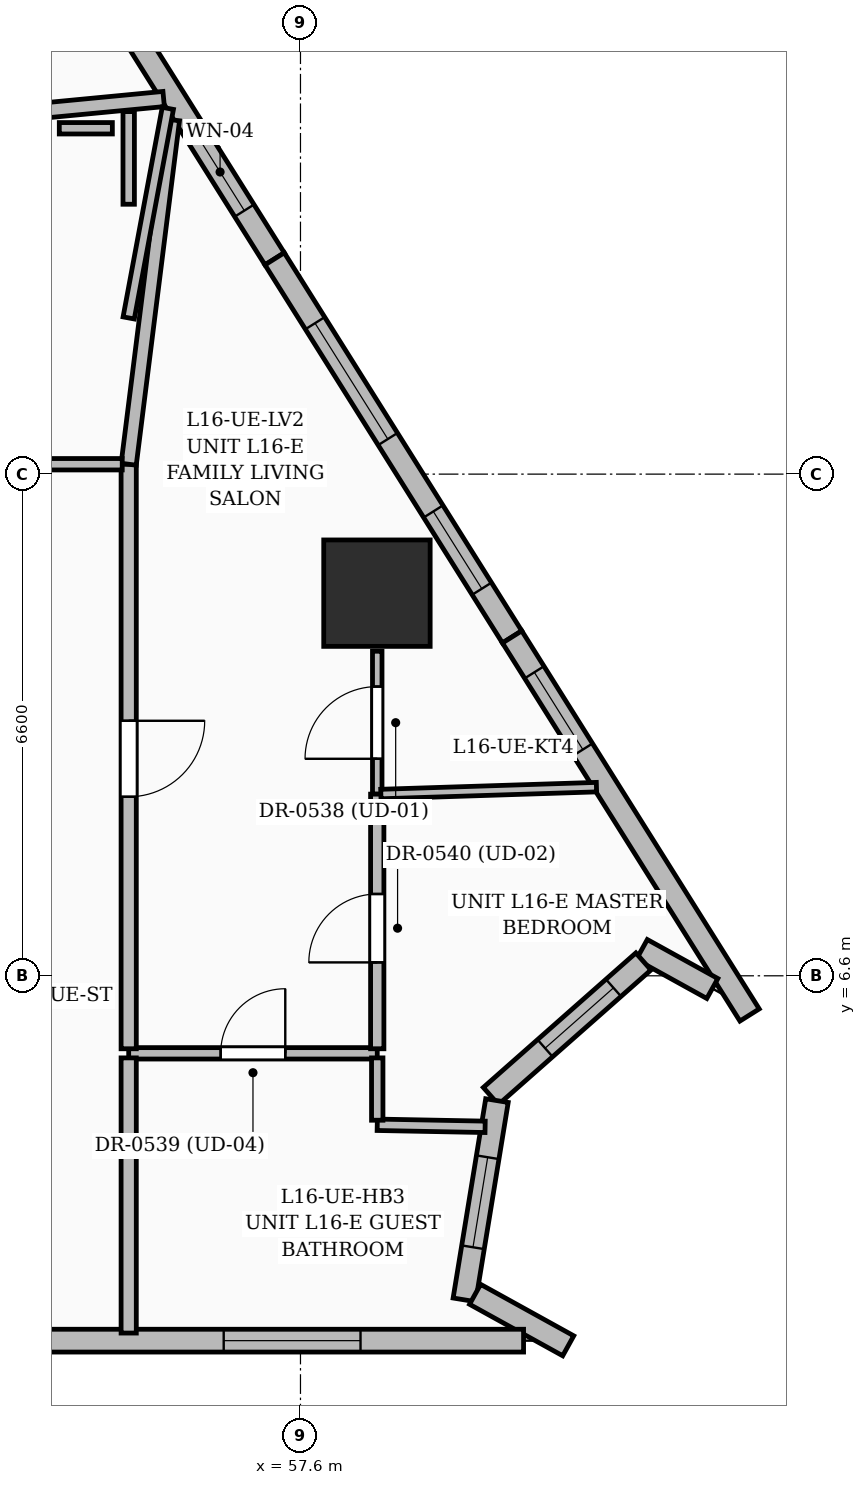
"""IFC4 building model, lengths in metres.
Left out: names, types, materials, properties, quantities, classifications, styles, units other than length and angle.
Written with IfcOpenShell. Run it as: python <this file> out.ifc"""

import sys

from ifc_helpers import new_model, si_unit, direction, frame, frame_2d, origin, origin_2d, place, context, subcontext, project, spatial, rectangle, extrude, element, fill, save


model = new_model("IFC4")
c1 = context("Model", 3, precision=1e-05, world=origin(), true_north=direction((0.0, 1.0)))
c2 = subcontext(c1, "Body", "Model", "MODEL_VIEW")
j1 = project(units=[si_unit("LENGTHUNIT", "METRE"), si_unit("PLANEANGLEUNIT", "RADIAN")], contexts=[c1])
p1 = place(None, origin())
s1 = spatial("IfcSite", under=j1, at=p1, CompositionType="ELEMENT")
p2 = place(p1, origin())
s2 = spatial("IfcBuilding", under=s1, at=p2, CompositionType="ELEMENT")
p3 = place(p2, frame((0.0, 0.0, 67.8)))
s3 = spatial("IfcBuildingStorey", under=s2, at=p3, CompositionType="ELEMENT", Elevation=67.8)
p4 = place(p3, frame((58.606, 11.634, 0.0), z_axis=(0.0, 0.0, 1.0), x_axis=(1.0, 0.0, 0.0)))
e1 = element("IfcColumn", 1, at=p4, inside=s3, PredefinedType="COLUMN", context=c2, shape_type="SweptSolid", body=[
    extrude(rectangle(XDim=1.4, YDim=1.4, at=origin_2d()), origin(), (0.0, 0.0, 1.0), 3.6),
])
p5 = place(p3, frame((54.282, 20.774, 0.0), z_axis=(0.0, 0.0, 1.0), x_axis=(0.531894679413, -0.846810516002, 0.0)))
e2 = element("IfcWall", 2, at=p5, inside=s3, PredefinedType="SOLIDWALL", context=c2, shape_type="SweptSolid", body=[
    extrude(rectangle(XDim=5.599, YDim=0.3, at=frame_2d((2.799, 0.0))), origin(), (0.0, 0.0, 1.0), 3.35),
])
p6 = place(p5, frame((3.65, 0.0, 0.8)))
e3 = element("IfcOpeningElement", 3, at=p6, cuts=e2, PredefinedType="OPENING", context=c2, shape_type="SweptSolid", body=[
    extrude(rectangle(XDim=1.2, YDim=1.8, at=frame_2d((0.6, 0.9))), frame((0.0, 0.16, 0.0), z_axis=(0.0, -1.0, 0.0), x_axis=(1.0, 0.0, 0.0)), (0.0, 0.0, 1.0), 0.32),
])
p7 = place(p3, frame((57.26, 16.032, 0.0), z_axis=(0.0, 0.0, 1.0), x_axis=(0.531936586971, -0.846784191776, 0.0)))
e4 = element("IfcWall", 4, at=p7, inside=s3, PredefinedType="SOLIDWALL", context=c2, shape_type="SweptSolid", body=[
    extrude(rectangle(XDim=5.874, YDim=0.3, at=frame_2d((2.937, 0.0))), origin(), (0.0, 0.0, 1.0), 3.35),
])
p8 = place(p7, frame((1.0, 0.0, 0.6)))
e5 = element("IfcOpeningElement", 5, at=p8, cuts=e4, PredefinedType="OPENING", context=c2, shape_type="SweptSolid", body=[
    extrude(rectangle(XDim=1.8, YDim=2.1, at=frame_2d((0.9, 1.05))), frame((0.0, 0.16, 0.0), z_axis=(0.0, -1.0, 0.0), x_axis=(1.0, 0.0, 0.0)), (0.0, 0.0, 1.0), 0.32),
])
p9 = place(p7, frame((3.925, 0.0, 0.8)))
e6 = element("IfcOpeningElement", 6, at=p9, cuts=e4, PredefinedType="OPENING", context=c2, shape_type="SweptSolid", body=[
    extrude(rectangle(XDim=1.2, YDim=1.8, at=frame_2d((0.6, 0.9))), frame((0.0, 0.16, 0.0), z_axis=(0.0, -1.0, 0.0), x_axis=(1.0, 0.0, 0.0)), (0.0, 0.0, 1.0), 0.32),
])
p10 = place(p3, frame((60.384, 11.059, 0.0), z_axis=(0.0, 0.0, 1.0), x_axis=(0.53188806159, -0.846814672723, 0.0)))
e7 = element("IfcWall", 7, at=p10, inside=s3, PredefinedType="SOLIDWALL", context=c2, shape_type="SweptSolid", body=[
    extrude(rectangle(XDim=5.874, YDim=0.3, at=frame_2d((2.937, 0.0))), origin(), (0.0, 0.0, 1.0), 3.35),
])
p11 = place(p10, frame((0.55, 0.0, 0.8)))
e8 = element("IfcOpeningElement", 8, at=p11, cuts=e7, PredefinedType="OPENING", context=c2, shape_type="SweptSolid", body=[
    extrude(rectangle(XDim=1.2, YDim=1.8, at=frame_2d((0.6, 0.9))), frame((0.0, 0.16, 0.0), z_axis=(0.0, -1.0, 0.0), x_axis=(1.0, 0.0, 0.0)), (0.0, 0.0, 1.0), 0.32),
])
p12 = place(p3, frame((63.018, 6.433, 0.0), z_axis=(0.0, 0.0, 1.0), x_axis=(-0.875144021508, 0.48386252347, 0.0)))
e9 = element("IfcWall", 9, at=p12, inside=s3, PredefinedType="SOLIDWALL", context=c2, shape_type="SweptSolid", body=[
    extrude(rectangle(XDim=1.06, YDim=0.3, at=frame_2d((0.53, 0.0))), origin(), (0.0, 0.0, 1.0), 3.35),
])
p13 = place(p3, frame((62.112, 6.789, 0.0), z_axis=(0.0, 0.0, 1.0), x_axis=(-0.749880449764, -0.661573360303, 0.0)))
e10 = element("IfcWall", 10, at=p13, inside=s3, PredefinedType="SOLIDWALL", context=c2, shape_type="SweptSolid", body=[
    extrude(rectangle(XDim=2.676, YDim=0.3, at=frame_2d((1.338, 0.0))), origin(), (0.0, 0.0, 1.0), 3.35),
])
p14 = place(p13, frame((0.525, 0.0, 0.8)))
e11 = element("IfcOpeningElement", 11, at=p14, cuts=e10, PredefinedType="OPENING", context=c2, shape_type="SweptSolid", body=[
    extrude(rectangle(XDim=1.2, YDim=1.8, at=frame_2d((0.6, 0.9))), frame((0.0, 0.16, 0.0), z_axis=(0.0, -1.0, 0.0), x_axis=(1.0, 0.0, 0.0)), (0.0, 0.0, 1.0), 0.32),
])
p15 = place(p3, frame((60.185, 4.958, 0.0), z_axis=(0.0, 0.0, 1.0), x_axis=(-0.16141694699, -0.986886300049, 0.0)))
e12 = element("IfcWall", 12, at=p15, inside=s3, PredefinedType="SOLIDWALL", context=c2, shape_type="SweptSolid", body=[
    extrude(rectangle(XDim=2.656, YDim=0.3, at=frame_2d((1.328, 0.0))), origin(), (0.0, 0.0, 1.0), 3.35),
])
p16 = place(p15, frame((0.755, 0.0, 0.8)))
e13 = element("IfcOpeningElement", 13, at=p16, cuts=e12, PredefinedType="OPENING", context=c2, shape_type="SweptSolid", body=[
    extrude(rectangle(XDim=1.2, YDim=1.8, at=frame_2d((0.6, 0.9))), frame((0.0, 0.16, 0.0), z_axis=(0.0, -1.0, 0.0), x_axis=(1.0, 0.0, 0.0)), (0.0, 0.0, 1.0), 0.32),
])
p17 = place(p3, frame((59.897, 2.41, 0.0), z_axis=(0.0, 0.0, 1.0), x_axis=(0.875216279123, -0.483731810777, 0.0)))
e14 = element("IfcWall", 14, at=p17, inside=s3, PredefinedType="SOLIDWALL", context=c2, shape_type="SweptSolid", body=[
    extrude(rectangle(XDim=1.4, YDim=0.3, at=frame_2d((0.7, 0.0))), origin(), (0.0, 0.0, 1.0), 3.35),
])
p18 = place(p3, frame((60.535, 1.8, 0.0), z_axis=(0.0, 0.0, 1.0), x_axis=(-1.0, 0.0, 0.0)))
e15 = element("IfcWall", 15, at=p18, inside=s3, PredefinedType="SOLIDWALL", context=c2, shape_type="SweptSolid", body=[
    extrude(rectangle(XDim=6.24, YDim=0.3, at=frame_2d((3.12, 0.0))), origin(), (0.0, 0.0, 1.0), 3.35),
])
p19 = place(p18, frame((2.145, 0.0, 0.6)))
e16 = element("IfcOpeningElement", 16, at=p19, cuts=e15, PredefinedType="OPENING", context=c2, shape_type="SweptSolid", body=[
    extrude(rectangle(XDim=1.8, YDim=2.1, at=frame_2d((0.9, 1.05))), frame((0.0, 0.16, 0.0), z_axis=(0.0, -1.0, 0.0), x_axis=(1.0, 0.0, 0.0)), (0.0, 0.0, 1.0), 0.32),
])
p20 = place(p3, frame((55.34, 5.58, 0.0), z_axis=(0.0, 0.0, 1.0), x_axis=(1.0, 0.0, 0.0)))
e17 = element("IfcWall", 17, at=p20, inside=s3, PredefinedType="PARTITIONING", context=c2, shape_type="SweptSolid", body=[
    extrude(rectangle(XDim=3.27, YDim=0.15, at=frame_2d((1.635, 0.0))), origin(), (0.0, 0.0, 1.0), 3.35),
])
p21 = place(p20, frame((1.21, 0.0, 0.0)))
e18 = element("IfcOpeningElement", 18, at=p21, cuts=e17, PredefinedType="OPENING", context=c2, shape_type="SweptSolid", body=[
    extrude(rectangle(XDim=0.85, YDim=2.1, at=frame_2d((0.425, 1.05))), frame((0.0, 0.085, 0.0), z_axis=(0.0, -1.0, 0.0), x_axis=(1.0, 0.0, 0.0)), (0.0, 0.0, 1.0), 0.17),
])
p22 = place(p3, frame((58.61, 8.99, 0.0), z_axis=(0.0, 0.0, 1.0), x_axis=(0.0, 1.0, 0.0)))
e19 = element("IfcWall", 19, at=p22, inside=s3, PredefinedType="PARTITIONING", context=c2, shape_type="SweptSolid", body=[
    extrude(rectangle(XDim=1.88, YDim=0.125, at=frame_2d((0.94, 0.0))), origin(), (0.0, 0.0, 1.0), 3.35),
])
p23 = place(p22, frame((0.465, 0.0, 0.0)))
e20 = element("IfcOpeningElement", 20, at=p23, cuts=e19, PredefinedType="OPENING", context=c2, shape_type="SweptSolid", body=[
    extrude(rectangle(XDim=0.95, YDim=2.2, at=frame_2d((0.475, 1.1))), frame((0.0, 0.072, 0.0), z_axis=(0.0, -1.0, 0.0), x_axis=(1.0, 0.0, 0.0)), (0.0, 0.0, 1.0), 0.145),
])
p24 = place(p3, frame((58.61, 5.64, 0.0), z_axis=(0.0, 0.0, 1.0), x_axis=(0.0, 1.0, 0.0)))
e21 = element("IfcWall", 21, at=p24, inside=s3, PredefinedType="PARTITIONING", context=c2, shape_type="SweptSolid", body=[
    extrude(rectangle(XDim=3.35, YDim=0.175, at=frame_2d((1.675, 0.0))), origin(), (0.0, 0.0, 1.0), 3.35),
])
p25 = place(p24, frame((1.136, 0.0, 0.0)))
e22 = element("IfcOpeningElement", 22, at=p25, cuts=e21, PredefinedType="OPENING", context=c2, shape_type="SweptSolid", body=[
    extrude(rectangle(XDim=0.9, YDim=2.15, at=frame_2d((0.45, 1.075))), frame((0.0, 0.097, 0.0), z_axis=(0.0, -1.0, 0.0), x_axis=(1.0, 0.0, 0.0)), (0.0, 0.0, 1.0), 0.195),
])
p26 = place(p3, frame((55.34, 13.33, 0.0), z_axis=(0.0, 0.0, 1.0), x_axis=(0.0, -1.0, 0.0)))
e23 = element("IfcWall", 23, at=p26, inside=s3, PredefinedType="PARTITIONING", context=c2, shape_type="SweptSolid", body=[
    extrude(rectangle(XDim=7.69, YDim=0.2, at=frame_2d((3.845, 0.0))), origin(), (0.0, 0.0, 1.0), 2.279),
])
p27 = place(p26, frame((3.375, 0.0, 0.0)))
e24 = element("IfcOpeningElement", 24, at=p27, cuts=e23, PredefinedType="OPENING", context=c2, shape_type="SweptSolid", body=[
    extrude(rectangle(XDim=1.0, YDim=2.2, at=frame_2d((0.5, 1.1))), frame((0.0, 0.11, 0.0), z_axis=(0.0, -1.0, 0.0), x_axis=(1.0, 0.0, 0.0)), (0.0, 0.0, 1.0), 0.22),
])
p28 = place(p3, frame((55.909, 17.861, 0.0), z_axis=(0.0, 0.0, 1.0), x_axis=(-0.124672960795, -0.992197889963, 0.0)))
e25 = element("IfcWall", 25, at=p28, inside=s3, PredefinedType="PARTITIONING", context=c2, shape_type="SweptSolid", body=[
    extrude(rectangle(XDim=4.567, YDim=0.2, at=frame_2d((2.283, 0.0))), origin(), (0.0, 0.0, 1.0), 2.37),
])
p29 = place(p3, frame((60.029, 4.613, 0.0), z_axis=(0.0, 0.0, 1.0), x_axis=(-0.999820944565, 0.018922970389, 0.0)))
e26 = element("IfcWall", 26, at=p29, inside=s3, PredefinedType="PARTITIONING", context=c2, shape_type="SweptSolid", body=[
    extrude(rectangle(XDim=1.419, YDim=0.15, at=frame_2d((0.709, 0.0))), origin(), (0.0, 0.0, 1.0), 3.35),
])
p30 = place(p3, frame((58.61, 4.7, 0.0), z_axis=(0.0, 0.0, 1.0), x_axis=(0.0, 1.0, 0.0)))
e27 = element("IfcWall", 27, at=p30, inside=s3, PredefinedType="PARTITIONING", context=c2, shape_type="SweptSolid", body=[
    extrude(rectangle(XDim=0.82, YDim=0.15, at=frame_2d((0.41, 0.0))), origin(), (0.0, 0.0, 1.0), 3.35),
])
p31 = place(p3, frame((55.34, 5.52, 0.0), z_axis=(0.0, 0.0, 1.0), x_axis=(0.0, -1.0, 0.0)))
e28 = element("IfcWall", 28, at=p31, inside=s3, PredefinedType="PARTITIONING", context=c2, shape_type="SweptSolid", body=[
    extrude(rectangle(XDim=3.62, YDim=0.2, at=frame_2d((1.81, 0.0))), origin(), (0.0, 0.0, 1.0), 3.35),
])
p32 = place(p3, frame((58.657, 8.991, 0.0), z_axis=(0.0, 0.0, 1.0), x_axis=(0.999487776669, 0.032002879404, 0.0)))
e29 = element("IfcWall", 29, at=p32, inside=s3, PredefinedType="PARTITIONING", context=c2, shape_type="SweptSolid", body=[
    extrude(rectangle(XDim=2.838, YDim=0.125, at=frame_2d((1.419, 0.0))), origin(), (0.0, 0.0, 1.0), 3.35),
])
p33 = place(p3, frame((55.255, 13.33, 0.0), z_axis=(0.0, 0.0, 1.0), x_axis=(-1.0, 0.0, 0.0)))
e30 = element("IfcWall", 30, at=p33, inside=s3, PredefinedType="PARTITIONING", context=c2, shape_type="SweptSolid", body=[
    extrude(rectangle(XDim=3.427, YDim=0.15, at=frame_2d((1.714, 0.0))), origin(), (0.0, 0.0, 1.0), 2.787),
])
p34 = place(p3, frame((55.8, 18.135, 0.0), z_axis=(0.0, 0.0, 1.0), x_axis=(-0.99544506708, -0.095336868139, 0.0)))
e31 = element("IfcWall", 31, at=p34, inside=s3, PredefinedType="PARTITIONING", context=c2, shape_type="SweptSolid", body=[
    extrude(rectangle(XDim=4.038, YDim=0.2, at=frame_2d((2.019, 0.0))), origin(), (0.0, 0.0, 1.0), 2.37),
])
p35 = place(p3, frame((55.34, 15.255, 0.0), z_axis=(0.0, 0.0, 1.0), x_axis=(0.183578983996, 0.98300496267, 0.0)))
e32 = element("IfcWall", 32, at=p35, inside=s3, PredefinedType="PARTITIONING", context=c2, shape_type="SweptSolid", body=[
    extrude(rectangle(XDim=2.805, YDim=0.15, at=frame_2d((1.402, 0.0))), origin(), (0.0, 0.0, 1.0), 2.37),
])
p36 = place(p3, frame((55.125, 17.75, 0.0), z_axis=(0.0, 0.0, 1.0), x_axis=(-1.0, 0.0, 0.0)))
e33 = element("IfcWall", 33, at=p36, inside=s3, PredefinedType="PARTITIONING", context=c2, shape_type="SweptSolid", body=[
    extrude(rectangle(XDim=0.698, YDim=0.15, at=frame_2d((0.349, 0.0))), origin(), (0.0, 0.0, 1.0), 2.37),
])
p37 = place(p3, frame((55.34, 17.969, 0.0), z_axis=(0.0, 0.0, 1.0), x_axis=(0.0, -1.0, 0.0)))
e34 = element("IfcWall", 34, at=p37, inside=s3, PredefinedType="PARTITIONING", context=c2, shape_type="SweptSolid", body=[
    extrude(rectangle(XDim=1.219, YDim=0.15, at=frame_2d((0.609, 0.0))), origin(), (0.0, 0.0, 1.0), 3.35),
])
p38 = place(p6, origin())
e35 = element("IfcWindow", 35, at=p38, inside=s3, PartitioningType="SINGLE_PANEL", PredefinedType="WINDOW", context=c2, shape_type="SweptSolid", body=[
    extrude(rectangle(XDim=1.2, YDim=1.8, at=frame_2d((0.6, 0.9))), frame((0.0, 0.03, 0.0), z_axis=(0.0, -1.0, 0.0), x_axis=(1.0, 0.0, 0.0)), (0.0, 0.0, 1.0), 0.06),
])
fill(e3, e35)
p39 = place(p8, origin())
e36 = element("IfcWindow", 36, at=p39, inside=s3, PartitioningType="SINGLE_PANEL", PredefinedType="WINDOW", context=c2, shape_type="SweptSolid", body=[
    extrude(rectangle(XDim=1.8, YDim=2.1, at=frame_2d((0.9, 1.05))), frame((0.0, 0.03, 0.0), z_axis=(0.0, -1.0, 0.0), x_axis=(1.0, 0.0, 0.0)), (0.0, 0.0, 1.0), 0.06),
])
fill(e5, e36)
p40 = place(p9, origin())
e37 = element("IfcWindow", 37, at=p40, inside=s3, PartitioningType="SINGLE_PANEL", PredefinedType="WINDOW", context=c2, shape_type="SweptSolid", body=[
    extrude(rectangle(XDim=1.2, YDim=1.8, at=frame_2d((0.6, 0.9))), frame((0.0, 0.03, 0.0), z_axis=(0.0, -1.0, 0.0), x_axis=(1.0, 0.0, 0.0)), (0.0, 0.0, 1.0), 0.06),
])
fill(e6, e37)
p41 = place(p11, origin())
e38 = element("IfcWindow", 38, at=p41, inside=s3, PartitioningType="SINGLE_PANEL", PredefinedType="WINDOW", context=c2, shape_type="SweptSolid", body=[
    extrude(rectangle(XDim=1.2, YDim=1.8, at=frame_2d((0.6, 0.9))), frame((0.0, 0.03, 0.0), z_axis=(0.0, -1.0, 0.0), x_axis=(1.0, 0.0, 0.0)), (0.0, 0.0, 1.0), 0.06),
])
fill(e8, e38)
p42 = place(p14, origin())
e39 = element("IfcWindow", 39, at=p42, inside=s3, PartitioningType="SINGLE_PANEL", PredefinedType="WINDOW", context=c2, shape_type="SweptSolid", body=[
    extrude(rectangle(XDim=1.2, YDim=1.8, at=frame_2d((0.6, 0.9))), frame((0.0, 0.03, 0.0), z_axis=(0.0, -1.0, 0.0), x_axis=(1.0, 0.0, 0.0)), (0.0, 0.0, 1.0), 0.06),
])
fill(e11, e39)
p43 = place(p16, origin())
e40 = element("IfcWindow", 40, at=p43, inside=s3, PartitioningType="SINGLE_PANEL", PredefinedType="WINDOW", context=c2, shape_type="SweptSolid", body=[
    extrude(rectangle(XDim=1.2, YDim=1.8, at=frame_2d((0.6, 0.9))), frame((0.0, 0.03, 0.0), z_axis=(0.0, -1.0, 0.0), x_axis=(1.0, 0.0, 0.0)), (0.0, 0.0, 1.0), 0.06),
])
fill(e13, e40)
p44 = place(p19, origin())
e41 = element("IfcWindow", 41, at=p44, inside=s3, PartitioningType="SINGLE_PANEL", PredefinedType="WINDOW", context=c2, shape_type="SweptSolid", body=[
    extrude(rectangle(XDim=1.8, YDim=2.1, at=frame_2d((0.9, 1.05))), frame((0.0, 0.03, 0.0), z_axis=(0.0, -1.0, 0.0), x_axis=(1.0, 0.0, 0.0)), (0.0, 0.0, 1.0), 0.06),
])
fill(e16, e41)
p45 = place(p23, origin())
e42 = element("IfcDoor", 42, at=p45, inside=s3, OperationType="SINGLE_SWING_LEFT", PredefinedType="DOOR", context=c2, shape_type="SweptSolid", body=[
    extrude(rectangle(XDim=0.95, YDim=2.2, at=frame_2d((0.475, 1.1))), frame((0.0, 0.025, 0.0), z_axis=(0.0, -1.0, 0.0), x_axis=(1.0, 0.0, 0.0)), (0.0, 0.0, 1.0), 0.05),
])
fill(e20, e42)
p46 = place(p21, origin())
e43 = element("IfcDoor", 43, at=p46, inside=s3, OperationType="SINGLE_SWING_RIGHT", PredefinedType="DOOR", context=c2, shape_type="SweptSolid", body=[
    extrude(rectangle(XDim=0.85, YDim=2.1, at=frame_2d((0.425, 1.05))), frame((0.0, 0.025, 0.0), z_axis=(0.0, -1.0, 0.0), x_axis=(1.0, 0.0, 0.0)), (0.0, 0.0, 1.0), 0.05),
])
fill(e18, e43)
p47 = place(p25, origin())
e44 = element("IfcDoor", 44, at=p47, inside=s3, OperationType="SINGLE_SWING_LEFT", PredefinedType="DOOR", context=c2, shape_type="SweptSolid", body=[
    extrude(rectangle(XDim=0.9, YDim=2.15, at=frame_2d((0.45, 1.075))), frame((0.0, 0.025, 0.0), z_axis=(0.0, -1.0, 0.0), x_axis=(1.0, 0.0, 0.0)), (0.0, 0.0, 1.0), 0.05),
])
fill(e22, e44)
p48 = place(p27, origin())
e45 = element("IfcDoor", 45, at=p48, inside=s3, OperationType="SINGLE_SWING_LEFT", PredefinedType="DOOR", context=c2, shape_type="SweptSolid", body=[
    extrude(rectangle(XDim=1.0, YDim=2.2, at=frame_2d((0.5, 1.1))), frame((0.0, 0.025, 0.0), z_axis=(0.0, -1.0, 0.0), x_axis=(1.0, 0.0, 0.0)), (0.0, 0.0, 1.0), 0.05),
])
fill(e24, e45)
save(model, sys.argv[1])
